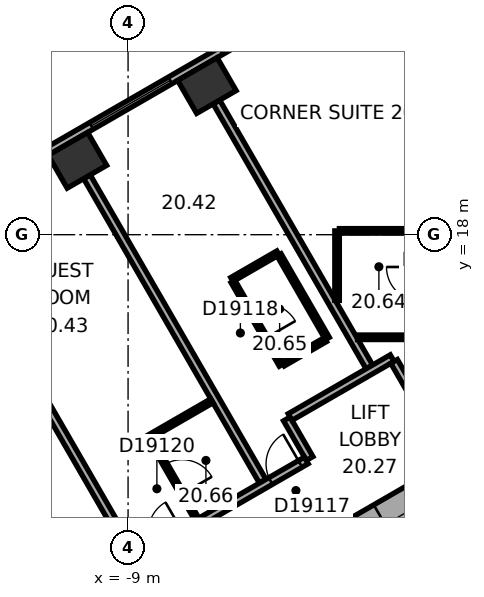
"""IFC4 building model, lengths in metres.
Left out: names, types, materials, properties, quantities, classifications, styles, units other than length and angle.
Written with IfcOpenShell. Run it as: python <this file> out.ifc"""

import sys

from ifc_helpers import new_model, si_unit, direction, frame, frame_2d, origin, origin_2d, place, context, subcontext, project, spatial, rectangle, extrude, element, fill, save


model = new_model("IFC4")
c1 = context("Model", 3, precision=1e-05, world=origin(), true_north=direction((0.0, 1.0)))
c2 = subcontext(c1, "Body", "Model", "MODEL_VIEW")
j1 = project(units=[si_unit("LENGTHUNIT", "METRE"), si_unit("PLANEANGLEUNIT", "RADIAN")], contexts=[c1])
p1 = place(None, origin())
s1 = spatial("IfcSite", under=j1, at=p1, CompositionType="ELEMENT")
p2 = place(p1, origin())
s2 = spatial("IfcBuilding", under=s1, at=p2, CompositionType="ELEMENT")
p3 = place(p2, frame((0.0, 0.0, 90.2)))
s3 = spatial("IfcBuildingStorey", under=s2, at=p3, CompositionType="ELEMENT", Elevation=90.2)
for number, where, z_axis, x_axis in (
    (1, (-6.926, 21.925, 0.0), (0.0, 0.0, 1.0), (-0.866, -0.5, 0.0)),
    (2, (-10.333, 19.957, 0.0), (0.0, 0.0, 1.0), (-0.866, -0.5, 0.0)),
):
    element("IfcColumn", number, at=place(p3, frame(where, z_axis=z_axis, x_axis=x_axis)), inside=s3, PredefinedType="COLUMN", context=c2, shape_type="SweptSolid", body=[
        extrude(rectangle(XDim=1.2, YDim=1.0, at=origin_2d()), origin(), (0.0, 0.0, 1.0), 3.3),
    ])
p4 = place(p3, frame((0.3, 11.836, 0.0), z_axis=(0.0, 0.0, 1.0), x_axis=(-0.866021384402, -0.500006961711, 0.0)))
e3 = element("IfcWall", 3, at=p4, inside=s3, PredefinedType="SHEAR", context=c2, shape_type="SweptSolid", body=[
    extrude(rectangle(XDim=12.355, YDim=1.2, at=frame_2d((6.178, 0.0))), origin(), (0.0, 0.0, 1.0), 3.3),
])
p5 = place(p4, frame((6.378, 0.0, 0.0)))
e4 = element("IfcOpeningElement", 4, at=p5, cuts=e3, PredefinedType="OPENING", context=c2, shape_type="SweptSolid", body=[
    extrude(rectangle(XDim=1.5, YDim=2.1, at=frame_2d((0.75, 1.05))), frame((0.0, 0.61, 0.0), z_axis=(0.0, -1.0, 0.0), x_axis=(1.0, 0.0, 0.0)), (0.0, 0.0, 1.0), 1.22),
])
p6 = place(p4, frame((1.828, 0.0, 0.0)))
e5 = element("IfcOpeningElement", 5, at=p6, cuts=e3, PredefinedType="OPENING", context=c2, shape_type="SweptSolid", body=[
    extrude(rectangle(XDim=1.1, YDim=2.1, at=frame_2d((0.55, 1.05))), frame((0.0, 0.61, 0.0), z_axis=(0.0, -1.0, 0.0), x_axis=(1.0, 0.0, 0.0)), (0.0, 0.0, 1.0), 1.22),
])
p7 = place(p3, frame((-3.136, 24.805, 0.0), z_axis=(0.0, 0.0, 1.0), x_axis=(-0.866028291626, -0.499994998079, 0.0)))
e6 = element("IfcWall", 6, at=p7, inside=s3, PredefinedType="STANDARD", context=c2, shape_type="SweptSolid", body=[
    extrude(rectangle(XDim=21.246, YDim=0.2, at=frame_2d((10.623, 0.0))), origin(), (0.0, 0.0, 1.0), 3.3),
])
p8 = place(p7, frame((1.555, 0.0, 0.8)))
e7 = element("IfcOpeningElement", 7, at=p8, cuts=e6, PredefinedType="OPENING", context=c2, shape_type="SweptSolid", body=[
    extrude(rectangle(XDim=2.4, YDim=1.7, at=frame_2d((1.2, 0.85))), frame((0.0, 0.11, 0.0), z_axis=(0.0, -1.0, 0.0), x_axis=(1.0, 0.0, 0.0)), (0.0, 0.0, 1.0), 0.22),
])
p9 = place(p7, frame((5.489, 0.0, 0.8)))
e8 = element("IfcOpeningElement", 8, at=p9, cuts=e6, PredefinedType="OPENING", context=c2, shape_type="SweptSolid", body=[
    extrude(rectangle(XDim=2.4, YDim=1.7, at=frame_2d((1.2, 0.85))), frame((0.0, 0.11, 0.0), z_axis=(0.0, -1.0, 0.0), x_axis=(1.0, 0.0, 0.0)), (0.0, 0.0, 1.0), 0.22),
])
p10 = place(p7, frame((9.424, 0.0, 0.8)))
e9 = element("IfcOpeningElement", 9, at=p10, cuts=e6, PredefinedType="OPENING", context=c2, shape_type="SweptSolid", body=[
    extrude(rectangle(XDim=2.4, YDim=1.7, at=frame_2d((1.2, 0.85))), frame((0.0, 0.11, 0.0), z_axis=(0.0, -1.0, 0.0), x_axis=(1.0, 0.0, 0.0)), (0.0, 0.0, 1.0), 0.22),
])
p11 = place(p7, frame((13.358, 0.0, 0.8)))
e10 = element("IfcOpeningElement", 10, at=p11, cuts=e6, PredefinedType="OPENING", context=c2, shape_type="SweptSolid", body=[
    extrude(rectangle(XDim=2.4, YDim=1.7, at=frame_2d((1.2, 0.85))), frame((0.0, 0.11, 0.0), z_axis=(0.0, -1.0, 0.0), x_axis=(1.0, 0.0, 0.0)), (0.0, 0.0, 1.0), 0.22),
])
p12 = place(p7, frame((17.293, 0.0, 0.8)))
e11 = element("IfcOpeningElement", 11, at=p12, cuts=e6, PredefinedType="OPENING", context=c2, shape_type="SweptSolid", body=[
    extrude(rectangle(XDim=2.4, YDim=1.7, at=frame_2d((1.2, 0.85))), frame((0.0, 0.11, 0.0), z_axis=(0.0, -1.0, 0.0), x_axis=(1.0, 0.0, 0.0)), (0.0, 0.0, 1.0), 0.22),
])
p13 = place(p3, frame((-11.385, 10.909, 0.0), z_axis=(0.0, 0.0, 1.0), x_axis=(0.500077547548, -0.865980627057, 0.0)))
e12 = element("IfcWall", 12, at=p13, inside=s3, PredefinedType="PARTITIONING", context=c2, shape_type="SweptSolid", body=[
    extrude(rectangle(XDim=2.44, YDim=0.12, at=frame_2d((1.22, 0.0))), origin(), (0.0, 0.0, 1.0), 3.05),
])
p14 = place(p13, frame((0.77, 0.0, 0.0)))
e13 = element("IfcOpeningElement", 13, at=p14, cuts=e12, PredefinedType="OPENING", context=c2, shape_type="SweptSolid", body=[
    extrude(rectangle(XDim=0.9, YDim=2.1, at=frame_2d((0.45, 1.05))), frame((0.0, 0.07, 0.0), z_axis=(0.0, -1.0, 0.0), x_axis=(1.0, 0.0, 0.0)), (0.0, 0.0, 1.0), 0.14),
])
p15 = place(p3, frame((-10.083, 19.524, 0.0), z_axis=(0.0, 0.0, 1.0), x_axis=(0.499999662836, -0.866025598446, 0.0)))
e14 = element("IfcWall", 14, at=p15, inside=s3, PredefinedType="PARTITIONING", context=c2, shape_type="SweptSolid", body=[
    extrude(rectangle(XDim=9.25, YDim=0.2, at=frame_2d((4.625, 0.0))), origin(), (0.0, 0.0, 1.0), 2.6),
])
p16 = place(p3, frame((-8.44, 12.679, 0.0), z_axis=(0.0, 0.0, 1.0), x_axis=(0.866044365799, 0.499967155389, 0.0)))
e15 = element("IfcWall", 15, at=p16, inside=s3, PredefinedType="PARTITIONING", context=c2, shape_type="SweptSolid", body=[
    extrude(rectangle(XDim=1.9, YDim=0.12, at=frame_2d((0.95, 0.0))), origin(), (0.0, 0.0, 1.0), 3.05),
])
p17 = place(p3, frame((-7.865, 7.814, 0.0), z_axis=(0.0, 0.0, 1.0), x_axis=(-0.500004234368, 0.866022959057, 0.0)))
e16 = element("IfcWall", 16, at=p17, inside=s3, PredefinedType="PARTITIONING", context=c2, shape_type="SweptSolid", body=[
    extrude(rectangle(XDim=11.25, YDim=0.2, at=frame_2d((5.625, 0.0))), origin(), (0.0, 0.0, 1.0), 3.05),
])
p18 = place(p17, frame((0.5, 0.0, 0.0)))
e17 = element("IfcOpeningElement", 17, at=p18, cuts=e16, PredefinedType="OPENING", context=c2, shape_type="SweptSolid", body=[
    extrude(rectangle(XDim=0.9, YDim=2.1, at=frame_2d((0.45, 1.05))), frame((0.0, 0.11, 0.0), z_axis=(0.0, -1.0, 0.0), x_axis=(1.0, 0.0, 0.0)), (0.0, 0.0, 1.0), 0.22),
])
p19 = place(p3, frame((-7.19, 10.513, 0.0), z_axis=(0.0, 0.0, 1.0), x_axis=(-0.499959183527, 0.866048967903, 0.0)))
e18 = element("IfcWall", 18, at=p19, inside=s3, PredefinedType="PARTITIONING", context=c2, shape_type="SweptSolid", body=[
    extrude(rectangle(XDim=2.44, YDim=0.12, at=frame_2d((1.22, 0.0))), origin(), (0.0, 0.0, 1.0), 3.05),
])
p20 = place(p19, frame((0.77, 0.0, 0.0)))
e19 = element("IfcOpeningElement", 19, at=p20, cuts=e18, PredefinedType="OPENING", context=c2, shape_type="SweptSolid", body=[
    extrude(rectangle(XDim=0.9, YDim=2.1, at=frame_2d((0.45, 1.05))), frame((0.0, 0.07, 0.0), z_axis=(0.0, -1.0, 0.0), x_axis=(1.0, 0.0, 0.0)), (0.0, 0.0, 1.0), 0.14),
])
p21 = place(p3, frame((-6.676, 21.492, 0.0), z_axis=(0.0, 0.0, 1.0), x_axis=(0.500011263043, -0.866018900966, 0.0)))
e20 = element("IfcWall", 20, at=p21, inside=s3, PredefinedType="PARTITIONING", context=c2, shape_type="SweptSolid", body=[
    extrude(rectangle(XDim=8.049, YDim=0.2, at=frame_2d((4.024, 0.0))), origin(), (0.0, 0.0, 1.0), 3.05),
])
p22 = place(p3, frame((-6.268, 16.82, 0.0), z_axis=(0.0, 0.0, 1.0), x_axis=(0.866002662425, 0.500039387122, 0.0)))
e21 = element("IfcWall", 21, at=p22, inside=s3, PredefinedType="PARTITIONING", context=c2, shape_type="SweptSolid", body=[
    extrude(rectangle(XDim=1.4, YDim=0.12, at=frame_2d((0.7, 0.0))), origin(), (0.0, 0.0, 1.0), 3.05),
])
p23 = place(p3, frame((-5.026, 17.469, 0.0), z_axis=(0.0, 0.0, 1.0), x_axis=(0.500005339912, -0.866022320763, 0.0)))
e22 = element("IfcWall", 22, at=p23, inside=s3, PredefinedType="PARTITIONING", context=c2, shape_type="SweptSolid", body=[
    extrude(rectangle(XDim=2.54, YDim=0.12, at=frame_2d((1.27, 0.0))), origin(), (0.0, 0.0, 1.0), 3.05),
])
p24 = place(p3, frame((-4.968, 14.569, 0.0), z_axis=(0.0, 0.0, 1.0), x_axis=(-0.500046963369, 0.865998287773, 0.0)))
e23 = element("IfcWall", 23, at=p24, inside=s3, PredefinedType="PARTITIONING", context=c2, shape_type="SweptSolid", body=[
    extrude(rectangle(XDim=2.54, YDim=0.12, at=frame_2d((1.27, 0.0))), origin(), (0.0, 0.0, 1.0), 3.05),
])
p25 = place(p24, frame((0.82, 0.0, 0.0)))
e24 = element("IfcOpeningElement", 24, at=p25, cuts=e23, PredefinedType="OPENING", context=c2, shape_type="SweptSolid", body=[
    extrude(rectangle(XDim=0.9, YDim=2.1, at=frame_2d((0.45, 1.05))), frame((0.0, 0.07, 0.0), z_axis=(0.0, -1.0, 0.0), x_axis=(1.0, 0.0, 0.0)), (0.0, 0.0, 1.0), 0.14),
])
p26 = place(p3, frame((-4.823, 13.152, 0.0), z_axis=(0.0, 0.0, 1.0), x_axis=(0.499986357472, -0.866033280158, 0.0)))
e25 = element("IfcWall", 25, at=p26, inside=s3, PredefinedType="PARTITIONING", context=c2, shape_type="SweptSolid", body=[
    extrude(rectangle(XDim=1.201, YDim=0.2, at=frame_2d((0.601, 0.0))), origin(), (0.0, 0.0, 1.0), 3.05),
])
p27 = place(p3, frame((-4.309, 12.061, 0.0), z_axis=(0.0, 0.0, 1.0), x_axis=(-0.866020679205, -0.500008183122, 0.0)))
e26 = element("IfcWall", 26, at=p27, inside=s3, PredefinedType="PARTITIONING", context=c2, shape_type="SweptSolid", body=[
    extrude(rectangle(XDim=5.104, YDim=0.2, at=frame_2d((2.552, 0.0))), origin(), (0.0, 0.0, 1.0), 3.05),
])
p28 = place(p27, frame((0.185, 0.0, 0.0)))
e27 = element("IfcOpeningElement", 27, at=p28, cuts=e26, PredefinedType="OPENING", context=c2, shape_type="SweptSolid", body=[
    extrude(rectangle(XDim=0.9, YDim=2.1, at=frame_2d((0.45, 1.05))), frame((0.0, 0.11, 0.0), z_axis=(0.0, -1.0, 0.0), x_axis=(1.0, 0.0, 0.0)), (0.0, 0.0, 1.0), 0.22),
])
p29 = place(p27, frame((3.761, 0.0, 0.0)))
e28 = element("IfcOpeningElement", 28, at=p29, cuts=e26, PredefinedType="OPENING", context=c2, shape_type="SweptSolid", body=[
    extrude(rectangle(XDim=0.9, YDim=2.1, at=frame_2d((0.45, 1.05))), frame((0.0, 0.11, 0.0), z_axis=(0.0, -1.0, 0.0), x_axis=(1.0, 0.0, 0.0)), (0.0, 0.0, 1.0), 0.22),
])
p30 = place(p3, frame((-3.808, 15.239, 0.0), z_axis=(0.0, 0.0, 1.0), x_axis=(-0.866087136806, -0.499893060024, 0.0)))
e29 = element("IfcWall", 29, at=p30, inside=s3, PredefinedType="PARTITIONING", context=c2, shape_type="SweptSolid", body=[
    extrude(rectangle(XDim=1.28, YDim=0.12, at=frame_2d((0.64, 0.0))), origin(), (0.0, 0.0, 1.0), 3.05),
])
p31 = place(p3, frame((-3.5, 16.271, 0.0), z_axis=(0.0, 0.0, 1.0), x_axis=(0.0, 1.0, 0.0)))
e30 = element("IfcWall", 30, at=p31, inside=s3, PredefinedType="PARTITIONING", context=c2, shape_type="SweptSolid", body=[
    extrude(rectangle(XDim=1.829, YDim=0.12, at=frame_2d((0.915, 0.0))), origin(), (0.0, 0.0, 1.0), 3.05),
])
p32 = place(p3, frame((-3.44, 18.101, 0.0), z_axis=(0.0, 0.0, 1.0), x_axis=(1.0, 0.0, 0.0)))
e31 = element("IfcWall", 31, at=p32, inside=s3, PredefinedType="PARTITIONING", context=c2, shape_type="SweptSolid", body=[
    extrude(rectangle(XDim=2.14, YDim=0.12, at=frame_2d((1.07, 0.0))), origin(), (0.0, 0.0, 1.0), 3.05),
])
p33 = place(p3, frame((-2.05, 14.752, 0.0), z_axis=(0.0, 0.0, 1.0), x_axis=(-0.866030936828, -0.499990416364, 0.0)))
e32 = element("IfcWall", 32, at=p33, inside=s3, PredefinedType="PARTITIONING", context=c2, shape_type="SweptSolid", body=[
    extrude(rectangle(XDim=3.102, YDim=0.2, at=frame_2d((1.551, 0.0))), origin(), (0.0, 0.0, 1.0), 3.05),
])
p34 = place(p3, frame((-1.449, 13.712, 0.0), z_axis=(0.0, 0.0, 1.0), x_axis=(-0.499978356969, 0.866037899034, 0.0)))
e33 = element("IfcWall", 33, at=p34, inside=s3, PredefinedType="PARTITIONING", context=c2, shape_type="SweptSolid", body=[
    extrude(rectangle(XDim=1.101, YDim=0.2, at=frame_2d((0.551, 0.0))), origin(), (0.0, 0.0, 1.0), 3.05),
])
p35 = place(p3, frame((-1.3, 15.301, 0.0), z_axis=(0.0, 0.0, 1.0), x_axis=(-1.0, 0.0, 0.0)))
e34 = element("IfcWall", 34, at=p35, inside=s3, PredefinedType="PARTITIONING", context=c2, shape_type="SweptSolid", body=[
    extrude(rectangle(XDim=1.661, YDim=0.12, at=frame_2d((0.831, 0.0))), origin(), (0.0, 0.0, 1.0), 3.05),
])
p36 = place(p9, origin())
e35 = element("IfcWindow", 35, at=p36, inside=s3, PartitioningType="SINGLE_PANEL", PredefinedType="WINDOW", context=c2, shape_type="SweptSolid", body=[
    extrude(rectangle(XDim=2.4, YDim=1.7, at=frame_2d((1.2, 0.85))), frame((0.0, 0.03, 0.0), z_axis=(0.0, -1.0, 0.0), x_axis=(1.0, 0.0, 0.0)), (0.0, 0.0, 1.0), 0.06),
])
fill(e8, e35)
p37 = place(p6, origin())
e36 = element("IfcDoor", 36, at=p37, inside=s3, OperationType="DOUBLE_DOOR_SLIDING", PredefinedType="DOOR", context=c2, shape_type="SweptSolid", body=[
    extrude(rectangle(XDim=1.1, YDim=2.1, at=frame_2d((0.55, 1.05))), frame((0.0, 0.025, 0.0), z_axis=(0.0, -1.0, 0.0), x_axis=(1.0, 0.0, 0.0)), (0.0, 0.0, 1.0), 0.05),
])
fill(e5, e36)
p38 = place(p28, origin())
e37 = element("IfcDoor", 37, at=p38, inside=s3, OperationType="SINGLE_SWING_LEFT", PredefinedType="DOOR", context=c2, shape_type="SweptSolid", body=[
    extrude(rectangle(XDim=0.9, YDim=2.1, at=frame_2d((0.45, 1.05))), frame((0.0, 0.025, 0.0), z_axis=(0.0, -1.0, 0.0), x_axis=(1.0, 0.0, 0.0)), (0.0, 0.0, 1.0), 0.05),
])
fill(e27, e37)
p39 = place(p25, origin())
e38 = element("IfcDoor", 38, at=p39, inside=s3, OperationType="SINGLE_SWING_LEFT", PredefinedType="DOOR", context=c2, shape_type="SweptSolid", body=[
    extrude(rectangle(XDim=0.9, YDim=2.1, at=frame_2d((0.45, 1.05))), frame((0.0, 0.025, 0.0), z_axis=(0.0, -1.0, 0.0), x_axis=(1.0, 0.0, 0.0)), (0.0, 0.0, 1.0), 0.05),
])
fill(e24, e38)
p40 = place(p20, origin())
e39 = element("IfcDoor", 39, at=p40, inside=s3, OperationType="SINGLE_SWING_LEFT", PredefinedType="DOOR", context=c2, shape_type="SweptSolid", body=[
    extrude(rectangle(XDim=0.9, YDim=2.1, at=frame_2d((0.45, 1.05))), frame((0.0, 0.025, 0.0), z_axis=(0.0, -1.0, 0.0), x_axis=(1.0, 0.0, 0.0)), (0.0, 0.0, 1.0), 0.05),
])
fill(e19, e39)
save(model, sys.argv[1])
